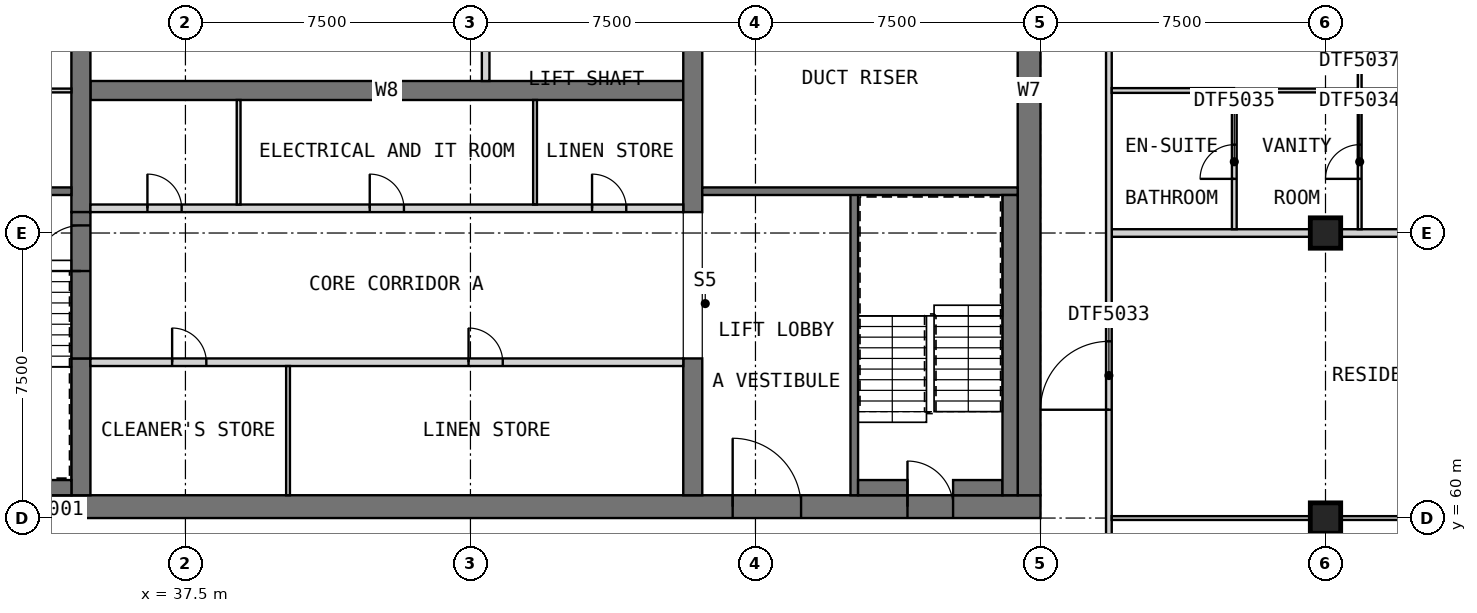
"""IFC4 building model, lengths in metres.
Left out: names, types, materials, properties, quantities, classifications, styles, units other than length and angle.
Written with IfcOpenShell. Run it as: python <this file> out.ifc"""

import sys

from ifc_helpers import new_model, si_unit, direction, frame, frame_2d, origin, origin_2d, place, context, subcontext, project, spatial, rectangle, extrude, element, fill, save


model = new_model("IFC4")
c1 = context("Model", 3, precision=1e-05, world=origin(), true_north=direction((0.0, 1.0)))
c2 = subcontext(c1, "Body", "Model", "MODEL_VIEW")
j1 = project(units=[si_unit("LENGTHUNIT", "METRE"), si_unit("PLANEANGLEUNIT", "RADIAN")], contexts=[c1])
p1 = place(None, origin())
s1 = spatial("IfcSite", under=j1, at=p1, CompositionType="ELEMENT")
p2 = place(p1, origin())
s2 = spatial("IfcBuilding", under=s1, at=p2, CompositionType="ELEMENT")
p3 = place(p2, frame((0.0, 0.0, 219.7)))
s3 = spatial("IfcBuildingStorey", under=s2, at=p3, CompositionType="ELEMENT", Elevation=219.7)
for number, where, z_axis, x_axis in (
    (1, (67.5, 60.0, 0.0), (0.0, 0.0, 1.0), (1.0, 0.0, 0.0)),
    (2, (67.5, 67.5, 0.0), (0.0, 0.0, 1.0), (1.0, 0.0, 0.0)),
):
    element("IfcColumn", number, at=place(p3, frame(where, z_axis=z_axis, x_axis=x_axis)), inside=s3, PredefinedType="COLUMN", context=c2, shape_type="SweptSolid", body=[
        extrude(rectangle(XDim=0.8, YDim=0.8, at=origin_2d()), origin(), (0.0, 0.0, 1.0), 3.5),
    ])
p4 = place(p3, frame((30.0, 60.3, 0.0), z_axis=(0.0, 0.0, 1.0), x_axis=(1.0, 0.0, 0.0)))
e3 = element("IfcWall", 3, at=p4, inside=s3, PredefinedType="SHEAR", context=c2, shape_type="SweptSolid", body=[
    extrude(rectangle(XDim=30.0, YDim=0.6, at=frame_2d((15.0, 0.0))), origin(), (0.0, 0.0, 1.0), 3.5),
])
p5 = place(p4, frame((21.9, 0.0, 0.0)))
e4 = element("IfcOpeningElement", 4, at=p5, cuts=e3, PredefinedType="OPENING", context=c2, shape_type="SweptSolid", body=[
    extrude(rectangle(XDim=1.8, YDim=2.1, at=frame_2d((0.9, 1.05))), frame((0.0, 0.31, 0.0), z_axis=(0.0, -1.0, 0.0), x_axis=(1.0, 0.0, 0.0)), (0.0, 0.0, 1.0), 0.62),
])
p6 = place(p4, frame((26.5, 0.0, 0.0)))
e5 = element("IfcOpeningElement", 5, at=p6, cuts=e3, PredefinedType="OPENING", context=c2, shape_type="SweptSolid", body=[
    extrude(rectangle(XDim=1.2, YDim=2.1, at=frame_2d((0.6, 1.05))), frame((0.0, 0.31, 0.0), z_axis=(0.0, -1.0, 0.0), x_axis=(1.0, 0.0, 0.0)), (0.0, 0.0, 1.0), 0.62),
])
p7 = place(p3, frame((59.7, 60.6, 0.0), z_axis=(0.0, 0.0, 1.0), x_axis=(0.0, 1.0, 0.0)))
e6 = element("IfcWall", 6, at=p7, inside=s3, PredefinedType="SHEAR", context=c2, shape_type="SweptSolid", body=[
    extrude(rectangle(XDim=21.3, YDim=0.6, at=frame_2d((10.65, 0.0))), origin(), (0.0, 0.0, 1.0), 3.5),
])
p8 = place(p7, frame((14.9, 0.0, 0.0)))
e7 = element("IfcOpeningElement", 7, at=p8, cuts=e6, PredefinedType="OPENING", context=c2, shape_type="SweptSolid", body=[
    extrude(rectangle(XDim=1.8, YDim=2.1, at=frame_2d((0.9, 1.05))), frame((0.0, 0.31, 0.0), z_axis=(0.0, -1.0, 0.0), x_axis=(1.0, 0.0, 0.0)), (0.0, 0.0, 1.0), 0.62),
])
p9 = place(p3, frame((35.0, 71.25, 0.0), z_axis=(0.0, 0.0, 1.0), x_axis=(1.0, 0.0, 0.0)))
e8 = element("IfcWall", 8, at=p9, inside=s3, PredefinedType="SHEAR", context=c2, shape_type="SweptSolid", body=[
    extrude(rectangle(XDim=15.6, YDim=0.5, at=frame_2d((7.8, 0.0))), origin(), (0.0, 0.0, 1.0), 3.5),
])
p10 = place(p3, frame((34.75, 60.6, 0.0), z_axis=(0.0, 0.0, 1.0), x_axis=(0.0, 1.0, 0.0)))
e9 = element("IfcWall", 9, at=p10, inside=s3, PredefinedType="SHEAR", context=c2, shape_type="SweptSolid", body=[
    extrude(rectangle(XDim=3.6, YDim=0.5, at=frame_2d((1.8, 0.0))), origin(), (0.0, 0.0, 1.0), 3.5),
])
p11 = place(p3, frame((34.75, 68.05, 0.0), z_axis=(0.0, 0.0, 1.0), x_axis=(0.0, 1.0, 0.0)))
e10 = element("IfcWall", 10, at=p11, inside=s3, PredefinedType="SHEAR", context=c2, shape_type="SweptSolid", body=[
    extrude(rectangle(XDim=6.4, YDim=0.5, at=frame_2d((3.2, 0.0))), origin(), (0.0, 0.0, 1.0), 3.5),
])
p12 = place(p3, frame((50.85, 60.6, 0.0), z_axis=(0.0, 0.0, 1.0), x_axis=(0.0, 1.0, 0.0)))
e11 = element("IfcWall", 11, at=p12, inside=s3, PredefinedType="SHEAR", context=c2, shape_type="SweptSolid", body=[
    extrude(rectangle(XDim=3.6, YDim=0.5, at=frame_2d((1.8, 0.0))), origin(), (0.0, 0.0, 1.0), 3.5),
])
p13 = place(p3, frame((50.85, 68.05, 0.0), z_axis=(0.0, 0.0, 1.0), x_axis=(0.0, 1.0, 0.0)))
e12 = element("IfcWall", 12, at=p13, inside=s3, PredefinedType="SHEAR", context=c2, shape_type="SweptSolid", body=[
    extrude(rectangle(XDim=6.4, YDim=0.5, at=frame_2d((3.2, 0.0))), origin(), (0.0, 0.0, 1.0), 3.5),
])
p14 = place(p3, frame((35.0, 64.1, 0.0), z_axis=(0.0, 0.0, 1.0), x_axis=(1.0, 0.0, 0.0)))
e13 = element("IfcWall", 13, at=p14, inside=s3, PredefinedType="PARTITIONING", context=c2, shape_type="SweptSolid", body=[
    extrude(rectangle(XDim=15.6, YDim=0.2, at=frame_2d((7.8, 0.0))), origin(), (0.0, 0.0, 1.0), 3.25),
])
p15 = place(p14, frame((2.15, 0.0, 0.0)))
e14 = element("IfcOpeningElement", 14, at=p15, cuts=e13, PredefinedType="OPENING", context=c2, shape_type="SweptSolid", body=[
    extrude(rectangle(XDim=0.9, YDim=2.1, at=frame_2d((0.45, 1.05))), frame((0.0, 0.11, 0.0), z_axis=(0.0, -1.0, 0.0), x_axis=(1.0, 0.0, 0.0)), (0.0, 0.0, 1.0), 0.22),
])
p16 = place(p14, frame((9.95, 0.0, 0.0)))
e15 = element("IfcOpeningElement", 15, at=p16, cuts=e13, PredefinedType="OPENING", context=c2, shape_type="SweptSolid", body=[
    extrude(rectangle(XDim=0.9, YDim=2.1, at=frame_2d((0.45, 1.05))), frame((0.0, 0.11, 0.0), z_axis=(0.0, -1.0, 0.0), x_axis=(1.0, 0.0, 0.0)), (0.0, 0.0, 1.0), 0.22),
])
p17 = place(p3, frame((40.2, 60.6, 0.0), z_axis=(0.0, 0.0, 1.0), x_axis=(0.0, 1.0, 0.0)))
e16 = element("IfcWall", 16, at=p17, inside=s3, PredefinedType="PARTITIONING", context=c2, shape_type="SweptSolid", body=[
    extrude(rectangle(XDim=3.4, YDim=0.1, at=frame_2d((1.7, 0.0))), origin(), (0.0, 0.0, 1.0), 3.25),
])
p18 = place(p3, frame((35.0, 68.15, 0.0), z_axis=(0.0, 0.0, 1.0), x_axis=(1.0, 0.0, 0.0)))
e17 = element("IfcWall", 17, at=p18, inside=s3, PredefinedType="PARTITIONING", context=c2, shape_type="SweptSolid", body=[
    extrude(rectangle(XDim=15.6, YDim=0.2, at=frame_2d((7.8, 0.0))), origin(), (0.0, 0.0, 1.0), 3.25),
])
p19 = place(p18, frame((1.5, 0.0, 0.0)))
e18 = element("IfcOpeningElement", 18, at=p19, cuts=e17, PredefinedType="OPENING", context=c2, shape_type="SweptSolid", body=[
    extrude(rectangle(XDim=0.9, YDim=2.1, at=frame_2d((0.45, 1.05))), frame((0.0, 0.11, 0.0), z_axis=(0.0, -1.0, 0.0), x_axis=(1.0, 0.0, 0.0)), (0.0, 0.0, 1.0), 0.22),
])
p20 = place(p18, frame((7.35, 0.0, 0.0)))
e19 = element("IfcOpeningElement", 19, at=p20, cuts=e17, PredefinedType="OPENING", context=c2, shape_type="SweptSolid", body=[
    extrude(rectangle(XDim=0.9, YDim=2.1, at=frame_2d((0.45, 1.05))), frame((0.0, 0.11, 0.0), z_axis=(0.0, -1.0, 0.0), x_axis=(1.0, 0.0, 0.0)), (0.0, 0.0, 1.0), 0.22),
])
p21 = place(p18, frame((13.2, 0.0, 0.0)))
e20 = element("IfcOpeningElement", 20, at=p21, cuts=e17, PredefinedType="OPENING", context=c2, shape_type="SweptSolid", body=[
    extrude(rectangle(XDim=0.9, YDim=2.1, at=frame_2d((0.45, 1.05))), frame((0.0, 0.11, 0.0), z_axis=(0.0, -1.0, 0.0), x_axis=(1.0, 0.0, 0.0)), (0.0, 0.0, 1.0), 0.22),
])
for number, where, z_axis, x_axis in (
    (21, (38.9, 68.25, 0.0), (0.0, 0.0, 1.0), (0.0, 1.0, 0.0)),
    (22, (46.7, 68.25, 0.0), (0.0, 0.0, 1.0), (0.0, 1.0, 0.0)),
):
    element("IfcWall", number, at=place(p3, frame(where, z_axis=z_axis, x_axis=x_axis)), inside=s3, PredefinedType="PARTITIONING", context=c2, shape_type="SweptSolid", body=[
        extrude(rectangle(XDim=2.75, YDim=0.1, at=frame_2d((1.375, 0.0))), origin(), (0.0, 0.0, 1.0), 3.25),
    ])
p22 = place(p3, frame((45.4, 71.5, 0.0), z_axis=(0.0, 0.0, 1.0), x_axis=(0.0, 1.0, 0.0)))
e23 = element("IfcWall", 23, at=p22, inside=s3, PredefinedType="SOLIDWALL", context=c2, shape_type="SweptSolid", body=[
    extrude(rectangle(XDim=2.0, YDim=0.2, at=frame_2d((1.0, 0.0))), origin(), (0.0, 0.0, 1.0), 3.5),
])
p23 = place(p3, frame((34.75, 64.2, 0.0), z_axis=(0.0, 0.0, 1.0), x_axis=(0.0, 1.0, 0.0)))
e24 = element("IfcWall", 24, at=p23, inside=s3, PredefinedType="SOLIDWALL", context=c2, shape_type="SweptSolid", body=[
    extrude(rectangle(XDim=3.85, YDim=0.5, at=frame_2d((1.925, 0.0))), origin(), (0.0, 0.0, 1.0), 2.3),
])
p24 = place(p23, frame((2.3, 0.0, 0.0)))
e25 = element("IfcOpeningElement", 25, at=p24, cuts=e24, PredefinedType="OPENING", context=c2, shape_type="SweptSolid", body=[
    extrude(rectangle(XDim=1.2, YDim=2.1, at=frame_2d((0.6, 1.05))), frame((0.0, 0.26, 0.0), z_axis=(0.0, -1.0, 0.0), x_axis=(1.0, 0.0, 0.0)), (0.0, 0.0, 1.0), 0.52),
])
p25 = place(p3, frame((30.6, 68.6, 0.0), z_axis=(0.0, 0.0, 1.0), x_axis=(1.0, 0.0, 0.0)))
e26 = element("IfcWall", 26, at=p25, inside=s3, PredefinedType="SOLIDWALL", context=c2, shape_type="SweptSolid", body=[
    extrude(rectangle(XDim=3.9, YDim=0.2, at=frame_2d((1.95, 0.0))), origin(), (0.0, 0.0, 1.0), 3.25),
])
p26 = place(p25, frame((1.7, 0.0, 0.0)))
e27 = element("IfcOpeningElement", 27, at=p26, cuts=e26, PredefinedType="OPENING", context=c2, shape_type="SweptSolid", body=[
    extrude(rectangle(XDim=0.9, YDim=2.1, at=frame_2d((0.45, 1.05))), frame((0.0, 0.11, 0.0), z_axis=(0.0, -1.0, 0.0), x_axis=(1.0, 0.0, 0.0)), (0.0, 0.0, 1.0), 0.22),
])
p27 = place(p3, frame((55.1, 60.6, 0.0), z_axis=(0.0, 0.0, 1.0), x_axis=(0.0, 1.0, 0.0)))
e28 = element("IfcWall", 28, at=p27, inside=s3, PredefinedType="SOLIDWALL", context=c2, shape_type="SweptSolid", body=[
    extrude(rectangle(XDim=8.0, YDim=0.2, at=frame_2d((4.0, 0.0))), origin(), (0.0, 0.0, 1.0), 3.25),
])
p28 = place(p3, frame((51.1, 68.6, 0.0), z_axis=(0.0, 0.0, 1.0), x_axis=(1.0, 0.0, 0.0)))
e29 = element("IfcWall", 29, at=p28, inside=s3, PredefinedType="SOLIDWALL", context=c2, shape_type="SweptSolid", body=[
    extrude(rectangle(XDim=8.3, YDim=0.2, at=frame_2d((4.15, 0.0))), origin(), (0.0, 0.0, 1.0), 3.25),
])
p29 = place(p3, frame((31.0, 60.8, 0.0), z_axis=(0.0, 0.0, 1.0), x_axis=(1.0, 0.0, 0.0)))
e30 = element("IfcWall", 30, at=p29, inside=s3, PredefinedType="SOLIDWALL", context=c2, shape_type="SweptSolid", body=[
    extrude(rectangle(XDim=3.5, YDim=0.4, at=frame_2d((1.75, 0.0))), origin(), (0.0, 0.0, 1.0), 3.25),
])
for number, where, z_axis, x_axis in (
    (31, (55.2, 60.8, 0.0), (0.0, 0.0, 1.0), (1.0, 0.0, 0.0)),
    (32, (57.7, 60.8, 0.0), (0.0, 0.0, 1.0), (1.0, 0.0, 0.0)),
):
    element("IfcWall", number, at=place(p3, frame(where, z_axis=z_axis, x_axis=x_axis)), inside=s3, PredefinedType="SOLIDWALL", context=c2, shape_type="SweptSolid", body=[
        extrude(rectangle(XDim=1.3, YDim=0.4, at=frame_2d((0.65, 0.0))), origin(), (0.0, 0.0, 1.0), 3.25),
    ])
p30 = place(p3, frame((59.2, 60.6, 0.0), z_axis=(0.0, 0.0, 1.0), x_axis=(0.0, 1.0, 0.0)))
e33 = element("IfcWall", 33, at=p30, inside=s3, PredefinedType="SOLIDWALL", context=c2, shape_type="SweptSolid", body=[
    extrude(rectangle(XDim=7.9, YDim=0.4, at=frame_2d((3.95, 0.0))), origin(), (0.0, 0.0, 1.0), 3.25),
])
p31 = place(p3, frame((30.6, 71.25, 0.0), z_axis=(0.0, 0.0, 1.0), x_axis=(1.0, 0.0, 0.0)))
e34 = element("IfcWall", 34, at=p31, inside=s3, PredefinedType="PARTITIONING", context=c2, shape_type="SweptSolid", body=[
    extrude(rectangle(XDim=3.9, YDim=0.1, at=frame_2d((1.95, 0.0))), origin(), (0.0, 0.0, 1.0), 3.25),
])
p32 = place(p3, frame((61.875, 67.5, 0.0), z_axis=(0.0, 0.0, 1.0), x_axis=(1.0, 0.0, 0.0)))
e35 = element("IfcWall", 35, at=p32, inside=s3, PredefinedType="PARTITIONING", context=c2, shape_type="SweptSolid", body=[
    extrude(rectangle(XDim=16.875, YDim=0.2, at=frame_2d((8.438, 0.0))), origin(), (0.0, 0.0, 1.0), 3.25),
])
p33 = place(p3, frame((61.8, 58.275, 0.0), z_axis=(0.0, 0.0, 1.0), x_axis=(0.0, 1.0, 0.0)))
e36 = element("IfcWall", 36, at=p33, inside=s3, PredefinedType="PARTITIONING", context=c2, shape_type="SweptSolid", body=[
    extrude(rectangle(XDim=25.95, YDim=0.15, at=frame_2d((12.975, 0.0))), origin(), (0.0, 0.0, 1.0), 3.25),
])
p34 = place(p33, frame((4.575, 0.0, 0.0)))
e37 = element("IfcOpeningElement", 37, at=p34, cuts=e36, PredefinedType="OPENING", context=c2, shape_type="SweptSolid", body=[
    extrude(rectangle(XDim=1.8, YDim=2.1, at=frame_2d((0.9, 1.05))), frame((0.0, 0.085, 0.0), z_axis=(0.0, -1.0, 0.0), x_axis=(1.0, 0.0, 0.0)), (0.0, 0.0, 1.0), 0.17),
])
p35 = place(p33, frame((14.4, 0.0, 0.0)))
e38 = element("IfcOpeningElement", 38, at=p35, cuts=e36, PredefinedType="OPENING", context=c2, shape_type="SweptSolid", body=[
    extrude(rectangle(XDim=0.9, YDim=2.1, at=frame_2d((0.45, 1.05))), frame((0.0, 0.085, 0.0), z_axis=(0.0, -1.0, 0.0), x_axis=(1.0, 0.0, 0.0)), (0.0, 0.0, 1.0), 0.17),
])
p36 = place(p3, frame((61.875, 60.0, 0.0), z_axis=(0.0, 0.0, 1.0), x_axis=(1.0, 0.0, 0.0)))
e39 = element("IfcWall", 39, at=p36, inside=s3, PredefinedType="PARTITIONING", context=c2, shape_type="SweptSolid", body=[
    extrude(rectangle(XDim=16.875, YDim=0.1, at=frame_2d((8.438, 0.0))), origin(), (0.0, 0.0, 1.0), 3.25),
])
p37 = place(p3, frame((65.163, 71.25, 0.0), z_axis=(0.0, 0.0, 1.0), x_axis=(1.0, 0.0, 0.0)))
e40 = element("IfcWall", 40, at=p37, inside=s3, PredefinedType="PARTITIONING", context=c2, shape_type="SweptSolid", body=[
    extrude(rectangle(XDim=12.777, YDim=0.1, at=frame_2d((6.389, 0.0))), origin(), (0.0, 0.0, 1.0), 3.25),
])
p38 = place(p37, frame((7.962, 0.0, 0.0)))
e41 = element("IfcOpeningElement", 41, at=p38, cuts=e40, PredefinedType="OPENING", context=c2, shape_type="SweptSolid", body=[
    extrude(rectangle(XDim=0.9, YDim=2.1, at=frame_2d((0.45, 1.05))), frame((0.0, 0.06, 0.0), z_axis=(0.0, -1.0, 0.0), x_axis=(1.0, 0.0, 0.0)), (0.0, 0.0, 1.0), 0.12),
])
p39 = place(p3, frame((68.4, 67.6, 0.0), z_axis=(0.0, 0.0, 1.0), x_axis=(0.0, 1.0, 0.0)))
e42 = element("IfcWall", 42, at=p39, inside=s3, PredefinedType="PARTITIONING", context=c2, shape_type="SweptSolid", body=[
    extrude(rectangle(XDim=14.8, YDim=0.1, at=frame_2d((7.4, 0.0))), origin(), (0.0, 0.0, 1.0), 3.25),
])
p40 = place(p39, frame((1.325, 0.0, 0.0)))
e43 = element("IfcOpeningElement", 43, at=p40, cuts=e42, PredefinedType="OPENING", context=c2, shape_type="SweptSolid", body=[
    extrude(rectangle(XDim=0.9, YDim=2.1, at=frame_2d((0.45, 1.05))), frame((0.0, 0.06, 0.0), z_axis=(0.0, -1.0, 0.0), x_axis=(1.0, 0.0, 0.0)), (0.0, 0.0, 1.0), 0.12),
])
p41 = place(p39, frame((5.075, 0.0, 0.0)))
e44 = element("IfcOpeningElement", 44, at=p41, cuts=e42, PredefinedType="OPENING", context=c2, shape_type="SweptSolid", body=[
    extrude(rectangle(XDim=0.9, YDim=2.1, at=frame_2d((0.45, 1.05))), frame((0.0, 0.06, 0.0), z_axis=(0.0, -1.0, 0.0), x_axis=(1.0, 0.0, 0.0)), (0.0, 0.0, 1.0), 0.12),
])
p42 = place(p39, frame((12.575, 0.0, 0.0)))
e45 = element("IfcOpeningElement", 45, at=p42, cuts=e42, PredefinedType="OPENING", context=c2, shape_type="SweptSolid", body=[
    extrude(rectangle(XDim=0.9, YDim=2.1, at=frame_2d((0.45, 1.05))), frame((0.0, 0.06, 0.0), z_axis=(0.0, -1.0, 0.0), x_axis=(1.0, 0.0, 0.0)), (0.0, 0.0, 1.0), 0.12),
])
p43 = place(p3, frame((61.875, 71.25, 0.0), z_axis=(0.0, 0.0, 1.0), x_axis=(1.0, 0.0, 0.0)))
e46 = element("IfcWall", 46, at=p43, inside=s3, PredefinedType="PARTITIONING", context=c2, shape_type="SweptSolid", body=[
    extrude(rectangle(XDim=3.225, YDim=0.125, at=frame_2d((1.613, 0.0))), origin(), (0.0, 0.0, 1.0), 3.25),
])
p44 = place(p3, frame((65.1, 67.6, 0.0), z_axis=(0.0, 0.0, 1.0), x_axis=(0.0, 1.0, 0.0)))
e47 = element("IfcWall", 47, at=p44, inside=s3, PredefinedType="PARTITIONING", context=c2, shape_type="SweptSolid", body=[
    extrude(rectangle(XDim=3.587, YDim=0.125, at=frame_2d((1.794, 0.0))), origin(), (0.0, 0.0, 1.0), 3.25),
])
p45 = place(p44, frame((1.325, 0.0, 0.0)))
e48 = element("IfcOpeningElement", 48, at=p45, cuts=e47, PredefinedType="OPENING", context=c2, shape_type="SweptSolid", body=[
    extrude(rectangle(XDim=0.9, YDim=2.1, at=frame_2d((0.45, 1.05))), frame((0.0, 0.073, 0.0), z_axis=(0.0, -1.0, 0.0), x_axis=(1.0, 0.0, 0.0)), (0.0, 0.0, 1.0), 0.145),
])
p46 = place(p15, origin())
e49 = element("IfcDoor", 49, at=p46, inside=s3, OperationType="SINGLE_SWING_RIGHT", PredefinedType="DOOR", context=c2, shape_type="SweptSolid", body=[
    extrude(rectangle(XDim=0.9, YDim=2.1, at=frame_2d((0.45, 1.05))), frame((0.0, 0.025, 0.0), z_axis=(0.0, -1.0, 0.0), x_axis=(1.0, 0.0, 0.0)), (0.0, 0.0, 1.0), 0.05),
])
fill(e14, e49)
p47 = place(p16, origin())
e50 = element("IfcDoor", 50, at=p47, inside=s3, OperationType="SINGLE_SWING_LEFT", PredefinedType="DOOR", context=c2, shape_type="SweptSolid", body=[
    extrude(rectangle(XDim=0.9, YDim=2.1, at=frame_2d((0.45, 1.05))), frame((0.0, 0.025, 0.0), z_axis=(0.0, -1.0, 0.0), x_axis=(1.0, 0.0, 0.0)), (0.0, 0.0, 1.0), 0.05),
])
fill(e15, e50)
p48 = place(p19, origin())
e51 = element("IfcDoor", 51, at=p48, inside=s3, OperationType="SINGLE_SWING_RIGHT", PredefinedType="DOOR", context=c2, shape_type="SweptSolid", body=[
    extrude(rectangle(XDim=0.9, YDim=2.1, at=frame_2d((0.45, 1.05))), frame((0.0, 0.025, 0.0), z_axis=(0.0, -1.0, 0.0), x_axis=(1.0, 0.0, 0.0)), (0.0, 0.0, 1.0), 0.05),
])
fill(e18, e51)
p49 = place(p20, origin())
e52 = element("IfcDoor", 52, at=p49, inside=s3, OperationType="SINGLE_SWING_LEFT", PredefinedType="DOOR", context=c2, shape_type="SweptSolid", body=[
    extrude(rectangle(XDim=0.9, YDim=2.1, at=frame_2d((0.45, 1.05))), frame((0.0, 0.025, 0.0), z_axis=(0.0, -1.0, 0.0), x_axis=(1.0, 0.0, 0.0)), (0.0, 0.0, 1.0), 0.05),
])
fill(e19, e52)
p50 = place(p21, origin())
e53 = element("IfcDoor", 53, at=p50, inside=s3, OperationType="SINGLE_SWING_RIGHT", PredefinedType="DOOR", context=c2, shape_type="SweptSolid", body=[
    extrude(rectangle(XDim=0.9, YDim=2.1, at=frame_2d((0.45, 1.05))), frame((0.0, 0.025, 0.0), z_axis=(0.0, -1.0, 0.0), x_axis=(1.0, 0.0, 0.0)), (0.0, 0.0, 1.0), 0.05),
])
fill(e20, e53)
p51 = place(p5, origin())
e54 = element("IfcDoor", 54, at=p51, inside=s3, OperationType="DOUBLE_DOOR_SINGLE_SWING", PredefinedType="DOOR", context=c2, shape_type="SweptSolid", body=[
    extrude(rectangle(XDim=1.8, YDim=2.1, at=frame_2d((0.9, 1.05))), frame((0.0, 0.025, 0.0), z_axis=(0.0, -1.0, 0.0), x_axis=(1.0, 0.0, 0.0)), (0.0, 0.0, 1.0), 0.05),
])
fill(e4, e54)
p52 = place(p24, origin())
e55 = element("IfcDoor", 55, at=p52, inside=s3, OperationType="SINGLE_SWING_LEFT", PredefinedType="DOOR", context=c2, shape_type="SweptSolid", body=[
    extrude(rectangle(XDim=1.2, YDim=2.1, at=frame_2d((0.6, 1.05))), frame((0.0, 0.025, 0.0), z_axis=(0.0, -1.0, 0.0), x_axis=(1.0, 0.0, 0.0)), (0.0, 0.0, 1.0), 0.05),
])
fill(e25, e55)
p53 = place(p6, origin())
e56 = element("IfcDoor", 56, at=p53, inside=s3, OperationType="SINGLE_SWING_LEFT", PredefinedType="DOOR", context=c2, shape_type="SweptSolid", body=[
    extrude(rectangle(XDim=1.2, YDim=2.1, at=frame_2d((0.6, 1.05))), frame((0.0, 0.025, 0.0), z_axis=(0.0, -1.0, 0.0), x_axis=(1.0, 0.0, 0.0)), (0.0, 0.0, 1.0), 0.05),
])
fill(e5, e56)
p54 = place(p34, origin())
e57 = element("IfcDoor", 57, at=p54, inside=s3, OperationType="DOUBLE_DOOR_SINGLE_SWING", PredefinedType="DOOR", context=c2, shape_type="SweptSolid", body=[
    extrude(rectangle(XDim=1.8, YDim=2.1, at=frame_2d((0.9, 1.05))), frame((0.0, 0.025, 0.0), z_axis=(0.0, -1.0, 0.0), x_axis=(1.0, 0.0, 0.0)), (0.0, 0.0, 1.0), 0.05),
])
fill(e37, e57)
p55 = place(p40, origin())
e58 = element("IfcDoor", 58, at=p55, inside=s3, OperationType="SINGLE_SWING_LEFT", PredefinedType="DOOR", context=c2, shape_type="SweptSolid", body=[
    extrude(rectangle(XDim=0.9, YDim=2.1, at=frame_2d((0.45, 1.05))), frame((0.0, 0.025, 0.0), z_axis=(0.0, -1.0, 0.0), x_axis=(1.0, 0.0, 0.0)), (0.0, 0.0, 1.0), 0.05),
])
fill(e43, e58)
p56 = place(p45, origin())
e59 = element("IfcDoor", 59, at=p56, inside=s3, OperationType="SINGLE_SWING_LEFT", PredefinedType="DOOR", context=c2, shape_type="SweptSolid", body=[
    extrude(rectangle(XDim=0.9, YDim=2.1, at=frame_2d((0.45, 1.05))), frame((0.0, 0.025, 0.0), z_axis=(0.0, -1.0, 0.0), x_axis=(1.0, 0.0, 0.0)), (0.0, 0.0, 1.0), 0.05),
])
fill(e48, e59)
save(model, sys.argv[1])
